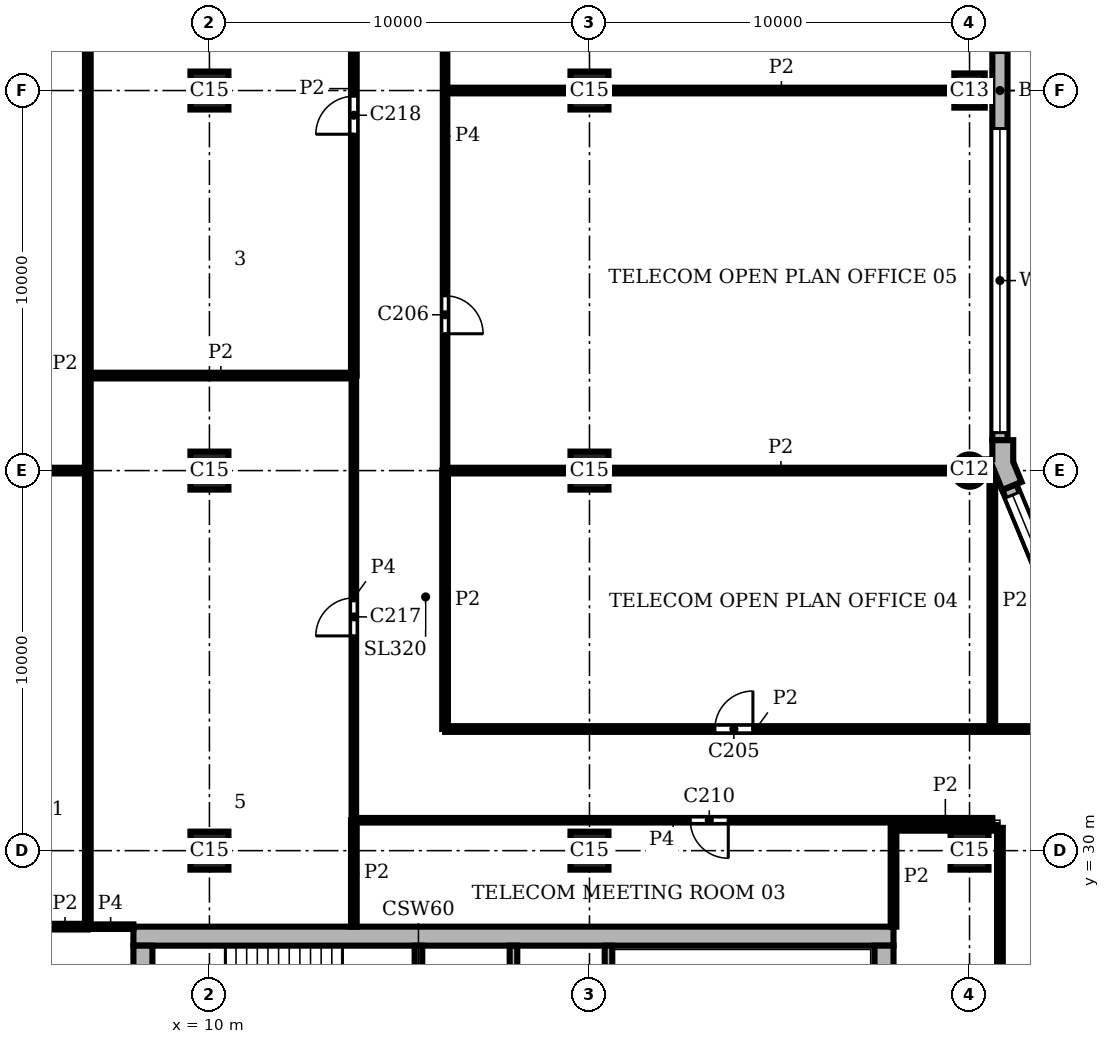
"""IFC4 building model, lengths in metres.
Left out: names, types, materials, properties, quantities, classifications, styles, units other than length and angle.
Written with IfcOpenShell. Run it as: python <this file> out.ifc"""

import sys

from ifc_helpers import new_model, si_unit, direction, frame, frame_2d, origin, origin_2d, place, context, subcontext, project, spatial, polyline, rectangle, circle, outline, extrude, element, fill, save


model = new_model("IFC4")
c1 = context("Model", 3, precision=1e-05, world=origin(), true_north=direction((0.0, 1.0)))
c2 = subcontext(c1, "Body", "Model", "MODEL_VIEW")
j1 = project(units=[si_unit("LENGTHUNIT", "METRE"), si_unit("PLANEANGLEUNIT", "RADIAN")], contexts=[c1])
p1 = place(None, origin())
s1 = spatial("IfcSite", under=j1, at=p1, CompositionType="ELEMENT")
p2 = place(p1, origin())
s2 = spatial("IfcBuilding", under=s1, at=p2, CompositionType="ELEMENT")
p3 = place(p2, frame((0.0, 0.0, 263.1)))
s3 = spatial("IfcBuildingStorey", under=s2, at=p3, CompositionType="ELEMENT", Elevation=263.1)
p4 = place(p3, frame((30.0, 40.0, 0.0), z_axis=(0.0, 0.0, 1.0), x_axis=(1.0, 0.0, 0.0)))
e1 = element("IfcColumn", 1, at=p4, inside=s3, PredefinedType="COLUMN", context=c2, shape_type="SweptSolid", body=[
    extrude(circle(Radius=0.425, at=origin_2d()), origin(), (0.0, 0.0, 1.0), 3.9),
])
p5 = place(p3, frame((30.0, 50.0, 0.0), z_axis=(0.0, 0.0, 1.0), x_axis=(0.0, 1.0, 0.0)))
e2 = element("IfcColumn", 2, at=p5, inside=s3, PredefinedType="COLUMN", context=c2, shape_type="SweptSolid", body=[
    extrude(rectangle(XDim=0.9, YDim=0.8, at=origin_2d()), origin(), (0.0, 0.0, 1.0), 3.9),
])
for number, where, z_axis, x_axis in (
    (3, (10.0, 30.0, 0.0), (0.0, 0.0, 1.0), (1.0, 0.0, 0.0)),
    (4, (10.0, 40.0, 0.0), (0.0, 0.0, 1.0), (1.0, 0.0, 0.0)),
    (5, (10.0, 50.0, 0.0), (0.0, 0.0, 1.0), (1.0, 0.0, 0.0)),
    (6, (20.0, 30.0, 0.0), (0.0, 0.0, 1.0), (1.0, 0.0, 0.0)),
    (7, (20.0, 40.0, 0.0), (0.0, 0.0, 1.0), (1.0, 0.0, 0.0)),
    (8, (20.0, 50.0, 0.0), (0.0, 0.0, 1.0), (1.0, 0.0, 0.0)),
    (9, (30.0, 30.0, 0.0), (0.0, 0.0, 1.0), (1.0, 0.0, 0.0)),
):
    element("IfcColumn", number, at=place(p3, frame(where, z_axis=z_axis, x_axis=x_axis)), inside=s3, PredefinedType="COLUMN", context=c2, shape_type="SweptSolid", body=[
        extrude(rectangle(XDim=1.0, YDim=1.0, at=origin_2d()), origin(), (0.0, 0.0, 1.0), 3.9),
    ])
p6 = place(p3, frame((27.75, 8.5, 0.0), z_axis=(0.0, 0.0, 1.0), x_axis=(0.0, 1.0, 0.0)))
e10 = element("IfcWall", 10, at=p6, inside=s3, PredefinedType="SHEAR", context=c2, shape_type="SweptSolid", body=[
    extrude(rectangle(XDim=19.0, YDim=0.5, at=frame_2d((9.5, 0.0))), origin(), (0.0, 0.0, 1.0), 3.9),
])
p7 = place(p6, frame((4.95, 0.0, 0.0)))
e11 = element("IfcOpeningElement", 11, at=p7, cuts=e10, PredefinedType="OPENING", context=c2, shape_type="SweptSolid", body=[
    extrude(rectangle(XDim=1.6, YDim=2.1, at=frame_2d((0.8, 1.05))), frame((0.0, 0.26, 0.0), z_axis=(0.0, -1.0, 0.0), x_axis=(1.0, 0.0, 0.0)), (0.0, 0.0, 1.0), 0.52),
])
p8 = place(p3, frame((28.0, 27.75, 0.0), z_axis=(0.0, 0.0, 1.0), x_axis=(-1.0, 0.0, 0.0)))
e12 = element("IfcWall", 12, at=p8, inside=s3, PredefinedType="SHEAR", context=c2, shape_type="SweptSolid", body=[
    extrude(rectangle(XDim=20.0, YDim=0.5, at=frame_2d((10.0, 0.0))), origin(), (0.0, 0.0, 1.0), 3.9),
])
p9 = place(p3, frame((8.25, 27.5, 0.0), z_axis=(0.0, 0.0, 1.0), x_axis=(0.0, -1.0, 0.0)))
e13 = element("IfcWall", 13, at=p9, inside=s3, PredefinedType="SHEAR", context=c2, shape_type="SweptSolid", body=[
    extrude(rectangle(XDim=19.0, YDim=0.5, at=frame_2d((9.5, 0.0))), origin(), (0.0, 0.0, 1.0), 3.9),
])
p10 = place(p3, origin())
e14 = element("IfcWall", 14, at=p10, inside=s3, PredefinedType="SOLIDWALL", context=c2, shape_type="SweptSolid", body=[
    extrude(outline(polyline([(30.62, 39.995), (30.62, 40.071), (30.861, 39.49), (31.23, 39.644), (31.369, 39.701), (31.15, 40.229), (31.15, 40.8), (31.0, 40.8), (30.6, 40.8), (30.6, 40.295), (30.425, 40.295), (30.425, 39.995), (30.62, 39.995)])), origin(), (0.0, 0.0, 1.0), 3.9),
])
p11 = place(p3, frame((33.362, 33.974, 0.0), z_axis=(0.0, 0.0, 1.0), x_axis=(-0.382655745237, 0.923891000409, 0.0)))
e15 = element("IfcWall", 15, at=p11, inside=s3, PredefinedType="SOLIDWALL", context=c2, shape_type="SweptSolid", body=[
    extrude(rectangle(XDim=6.053, YDim=0.4, at=frame_2d((3.027, 0.0))), origin(), (0.0, 0.0, 1.0), 3.9),
])
p12 = place(p11, frame((0.227, 0.0, 0.9)))
e16 = element("IfcOpeningElement", 16, at=p12, cuts=e15, PredefinedType="OPENING", context=c2, shape_type="SweptSolid", body=[
    extrude(rectangle(XDim=5.6, YDim=2.35, at=frame_2d((2.8, 1.175))), frame((0.0, 0.21, 0.0), z_axis=(0.0, -1.0, 0.0), x_axis=(1.0, 0.0, 0.0)), (0.0, 0.0, 1.0), 0.42),
])
p13 = place(p3, frame((30.8, 40.8, 0.0), z_axis=(0.0, 0.0, 1.0), x_axis=(0.0, 1.0, 0.0)))
e17 = element("IfcWall", 17, at=p13, inside=s3, PredefinedType="SOLIDWALL", context=c2, shape_type="SweptSolid", body=[
    extrude(rectangle(XDim=18.4, YDim=0.4, at=frame_2d((9.2, 0.0))), origin(), (0.0, 0.0, 1.0), 3.9),
])
p14 = place(p13, frame((0.2, 0.0, 0.9)))
e18 = element("IfcOpeningElement", 18, at=p14, cuts=e17, PredefinedType="OPENING", context=c2, shape_type="SweptSolid", body=[
    extrude(rectangle(XDim=8.0, YDim=2.35, at=frame_2d((4.0, 1.175))), frame((0.0, 0.21, 0.0), z_axis=(0.0, -1.0, 0.0), x_axis=(1.0, 0.0, 0.0)), (0.0, 0.0, 1.0), 0.42),
])
p15 = place(p13, frame((10.2, 0.0, 0.9)))
e19 = element("IfcOpeningElement", 19, at=p15, cuts=e17, PredefinedType="OPENING", context=c2, shape_type="SweptSolid", body=[
    extrude(rectangle(XDim=8.0, YDim=2.35, at=frame_2d((4.0, 1.175))), frame((0.0, 0.21, 0.0), z_axis=(0.0, -1.0, 0.0), x_axis=(1.0, 0.0, 0.0)), (0.0, 0.0, 1.0), 0.42),
])
p16 = place(p3, frame((15.5, 23.6, 0.0), z_axis=(0.0, 0.0, 1.0), x_axis=(0.0, 1.0, 0.0)))
e20 = element("IfcWall", 20, at=p16, inside=s3, PredefinedType="SHEAR", context=c2, shape_type="SweptSolid", body=[
    extrude(rectangle(XDim=3.9, YDim=0.2, at=frame_2d((1.95, 0.0))), origin(), (0.0, 0.0, 1.0), 3.58),
])
p17 = place(p3, frame((18.0, 20.0, 0.0), z_axis=(0.0, 0.0, 1.0), x_axis=(0.0, 1.0, 0.0)))
e21 = element("IfcWall", 21, at=p17, inside=s3, PredefinedType="SHEAR", context=c2, shape_type="SweptSolid", body=[
    extrude(rectangle(XDim=7.5, YDim=0.2, at=frame_2d((3.75, 0.0))), origin(), (0.0, 0.0, 1.0), 3.58),
])
p18 = place(p17, frame((1.2, 0.0, 0.0)))
e22 = element("IfcOpeningElement", 22, at=p18, cuts=e21, PredefinedType="OPENING", context=c2, shape_type="SweptSolid", body=[
    extrude(rectangle(XDim=1.2, YDim=2.1, at=frame_2d((0.6, 1.05))), frame((0.0, 0.11, 0.0), z_axis=(0.0, -1.0, 0.0), x_axis=(1.0, 0.0, 0.0)), (0.0, 0.0, 1.0), 0.22),
])
p19 = place(p3, frame((20.5, 23.6, 0.0), z_axis=(0.0, 0.0, 1.0), x_axis=(0.0, 1.0, 0.0)))
e23 = element("IfcWall", 23, at=p19, inside=s3, PredefinedType="SHEAR", context=c2, shape_type="SweptSolid", body=[
    extrude(rectangle(XDim=3.9, YDim=0.2, at=frame_2d((1.95, 0.0))), origin(), (0.0, 0.0, 1.0), 3.58),
])
p20 = place(p3, frame((6.8, 28.0, 0.0), z_axis=(0.0, 0.0, 1.0), x_axis=(0.0, 1.0, 0.0)))
e24 = element("IfcWall", 24, at=p20, inside=s3, PredefinedType="PARTITIONING", context=c2, shape_type="SweptSolid", body=[
    extrude(rectangle(XDim=29.6, YDim=0.15, at=frame_2d((14.8, 0.0))), origin(), (0.0, 0.0, 1.0), 3.58),
])
p21 = place(p3, frame((13.8, 28.0, 0.0), z_axis=(0.0, 0.0, 1.0), x_axis=(0.0, 1.0, 0.0)))
e25 = element("IfcWall", 25, at=p21, inside=s3, PredefinedType="PARTITIONING", context=c2, shape_type="SweptSolid", body=[
    extrude(rectangle(XDim=2.8, YDim=0.15, at=frame_2d((1.4, 0.0))), origin(), (0.0, 0.0, 1.0), 3.58),
])
p22 = place(p3, frame((13.8, 42.5, 0.0), z_axis=(0.0, 0.0, 1.0), x_axis=(0.0, 1.0, 0.0)))
e26 = element("IfcWall", 26, at=p22, inside=s3, PredefinedType="PARTITIONING", context=c2, shape_type="SweptSolid", body=[
    extrude(rectangle(XDim=15.1, YDim=0.15, at=frame_2d((7.55, 0.0))), origin(), (0.0, 0.0, 1.0), 3.58),
])
p23 = place(p22, frame((6.35, 0.0, 0.0)))
e27 = element("IfcOpeningElement", 27, at=p23, cuts=e26, PredefinedType="OPENING", context=c2, shape_type="SweptSolid", body=[
    extrude(rectangle(XDim=1.0, YDim=2.1, at=frame_2d((0.5, 1.05))), frame((0.0, 0.085, 0.0), z_axis=(0.0, -1.0, 0.0), x_axis=(1.0, 0.0, 0.0)), (0.0, 0.0, 1.0), 0.17),
])
p24 = place(p3, frame((16.2, 33.2, 0.0), z_axis=(0.0, 0.0, 1.0), x_axis=(0.0, 1.0, 0.0)))
e28 = element("IfcWall", 28, at=p24, inside=s3, PredefinedType="PARTITIONING", context=c2, shape_type="SweptSolid", body=[
    extrude(rectangle(XDim=6.8, YDim=0.15, at=frame_2d((3.4, 0.0))), origin(), (0.0, 0.0, 1.0), 3.58),
])
p25 = place(p3, frame((28.0, 28.0, 0.0), z_axis=(0.0, 0.0, 1.0), x_axis=(0.0, 1.0, 0.0)))
e29 = element("IfcWall", 29, at=p25, inside=s3, PredefinedType="PARTITIONING", context=c2, shape_type="SweptSolid", body=[
    extrude(rectangle(XDim=2.598, YDim=0.15, at=frame_2d((1.299, 0.0))), origin(), (0.0, 0.0, 1.0), 3.58),
])
p26 = place(p3, frame((30.6, 33.2, 0.0), z_axis=(0.0, 0.0, 1.0), x_axis=(0.0, 1.0, 0.0)))
e30 = element("IfcWall", 30, at=p26, inside=s3, PredefinedType="PARTITIONING", context=c2, shape_type="SweptSolid", body=[
    extrude(rectangle(XDim=6.738, YDim=0.15, at=frame_2d((3.369, 0.0))), origin(), (0.0, 0.0, 1.0), 3.58),
])
p27 = place(p3, frame((30.8, 15.45, 0.0), z_axis=(0.0, 0.0, 1.0), x_axis=(0.0, 1.0, 0.0)))
e31 = element("IfcWall", 31, at=p27, inside=s3, PredefinedType="PARTITIONING", context=c2, shape_type="SweptSolid", body=[
    extrude(rectangle(XDim=15.15, YDim=0.15, at=frame_2d((7.575, 0.0))), origin(), (0.0, 0.0, 1.0), 3.58),
])
p28 = place(p27, frame((8.6, 0.0, 0.0)))
e32 = element("IfcOpeningElement", 32, at=p28, cuts=e31, PredefinedType="OPENING", context=c2, shape_type="SweptSolid", body=[
    extrude(rectangle(XDim=1.0, YDim=2.1, at=frame_2d((0.5, 1.05))), frame((0.0, 0.085, 0.0), z_axis=(0.0, -1.0, 0.0), x_axis=(1.0, 0.0, 0.0)), (0.0, 0.0, 1.0), 0.17),
])
p29 = place(p3, frame((5.6, 28.0, 0.0), z_axis=(0.0, 0.0, 1.0), x_axis=(1.0, 0.0, 0.0)))
e33 = element("IfcWall", 33, at=p29, inside=s3, PredefinedType="PARTITIONING", context=c2, shape_type="SweptSolid", body=[
    extrude(rectangle(XDim=1.2, YDim=0.15, at=frame_2d((0.6, 0.0))), origin(), (0.0, 0.0, 1.0), 3.58),
])
p30 = place(p3, frame((28.002, 30.6, 0.0), z_axis=(0.0, 0.0, 1.0), x_axis=(1.0, 0.0, 0.0)))
e34 = element("IfcWall", 34, at=p30, inside=s3, PredefinedType="PARTITIONING", context=c2, shape_type="SweptSolid", body=[
    extrude(rectangle(XDim=2.723, YDim=0.15, at=frame_2d((1.362, 0.0))), origin(), (0.0, 0.0, 1.0), 3.58),
])
p31 = place(p3, frame((16.2, 33.2, 0.0), z_axis=(0.0, 0.0, 1.0), x_axis=(1.0, 0.0, 0.0)))
e35 = element("IfcWall", 35, at=p31, inside=s3, PredefinedType="PARTITIONING", context=c2, shape_type="SweptSolid", body=[
    extrude(rectangle(XDim=16.352, YDim=0.15, at=frame_2d((8.176, 0.0))), origin(), (0.0, 0.0, 1.0), 3.58),
])
p32 = place(p31, frame((7.1, 0.0, 0.0)))
e36 = element("IfcOpeningElement", 36, at=p32, cuts=e35, PredefinedType="OPENING", context=c2, shape_type="SweptSolid", body=[
    extrude(rectangle(XDim=1.0, YDim=2.1, at=frame_2d((0.5, 1.05))), frame((0.0, 0.085, 0.0), z_axis=(0.0, -1.0, 0.0), x_axis=(1.0, 0.0, 0.0)), (0.0, 0.0, 1.0), 0.17),
])
p33 = place(p3, frame((0.4, 40.0, 0.0), z_axis=(0.0, 0.0, 1.0), x_axis=(1.0, 0.0, 0.0)))
e37 = element("IfcWall", 37, at=p33, inside=s3, PredefinedType="PARTITIONING", context=c2, shape_type="SweptSolid", body=[
    extrude(rectangle(XDim=6.4, YDim=0.15, at=frame_2d((3.2, 0.0))), origin(), (0.0, 0.0, 1.0), 3.58),
])
p34 = place(p3, frame((16.2, 40.0, 0.0), z_axis=(0.0, 0.0, 1.0), x_axis=(1.0, 0.0, 0.0)))
e38 = element("IfcWall", 38, at=p34, inside=s3, PredefinedType="PARTITIONING", context=c2, shape_type="SweptSolid", body=[
    extrude(rectangle(XDim=3.3, YDim=0.15, at=frame_2d((1.65, 0.0))), origin(), (0.0, 0.0, 1.0), 3.58),
])
p35 = place(p3, frame((20.5, 40.0, 0.0), z_axis=(0.0, 0.0, 1.0), x_axis=(1.0, 0.0, 0.0)))
e39 = element("IfcWall", 39, at=p35, inside=s3, PredefinedType="PARTITIONING", context=c2, shape_type="SweptSolid", body=[
    extrude(rectangle(XDim=9.075, YDim=0.15, at=frame_2d((4.538, 0.0))), origin(), (0.0, 0.0, 1.0), 3.58),
])
p36 = place(p3, frame((6.8, 42.5, 0.0), z_axis=(0.0, 0.0, 1.0), x_axis=(1.0, 0.0, 0.0)))
e40 = element("IfcWall", 40, at=p36, inside=s3, PredefinedType="PARTITIONING", context=c2, shape_type="SweptSolid", body=[
    extrude(rectangle(XDim=7.0, YDim=0.15, at=frame_2d((3.5, 0.0))), origin(), (0.0, 0.0, 1.0), 3.58),
])
p37 = place(p3, frame((16.2, 50.0, 0.0), z_axis=(0.0, 0.0, 1.0), x_axis=(1.0, 0.0, 0.0)))
e41 = element("IfcWall", 41, at=p37, inside=s3, PredefinedType="PARTITIONING", context=c2, shape_type="SweptSolid", body=[
    extrude(rectangle(XDim=3.3, YDim=0.15, at=frame_2d((1.65, 0.0))), origin(), (0.0, 0.0, 1.0), 3.58),
])
p38 = place(p3, frame((20.5, 50.0, 0.0), z_axis=(0.0, 0.0, 1.0), x_axis=(1.0, 0.0, 0.0)))
e42 = element("IfcWall", 42, at=p38, inside=s3, PredefinedType="PARTITIONING", context=c2, shape_type="SweptSolid", body=[
    extrude(rectangle(XDim=9.1, YDim=0.15, at=frame_2d((4.55, 0.0))), origin(), (0.0, 0.0, 1.0), 3.58),
])
p39 = place(p3, frame((13.8, 30.8, 0.0), z_axis=(0.0, 0.0, 1.0), x_axis=(0.0, 1.0, 0.0)))
e43 = element("IfcWall", 43, at=p39, inside=s3, PredefinedType="PARTITIONING", context=c2, shape_type="SweptSolid", body=[
    extrude(rectangle(XDim=11.7, YDim=0.12, at=frame_2d((5.85, 0.0))), origin(), (0.0, 0.0, 1.0), 3.58),
])
p40 = place(p39, frame((4.85, 0.0, 0.0)))
e44 = element("IfcOpeningElement", 44, at=p40, cuts=e43, PredefinedType="OPENING", context=c2, shape_type="SweptSolid", body=[
    extrude(rectangle(XDim=1.0, YDim=2.1, at=frame_2d((0.5, 1.05))), frame((0.0, 0.07, 0.0), z_axis=(0.0, -1.0, 0.0), x_axis=(1.0, 0.0, 0.0)), (0.0, 0.0, 1.0), 0.14),
])
p41 = place(p3, frame((16.2, 40.0, 0.0), z_axis=(0.0, 0.0, 1.0), x_axis=(0.0, 1.0, 0.0)))
e45 = element("IfcWall", 45, at=p41, inside=s3, PredefinedType="PARTITIONING", context=c2, shape_type="SweptSolid", body=[
    extrude(rectangle(XDim=17.6, YDim=0.12, at=frame_2d((8.8, 0.0))), origin(), (0.0, 0.0, 1.0), 3.58),
])
p42 = place(p41, frame((3.6, 0.0, 0.0)))
e46 = element("IfcOpeningElement", 46, at=p42, cuts=e45, PredefinedType="OPENING", context=c2, shape_type="SweptSolid", body=[
    extrude(rectangle(XDim=1.0, YDim=2.1, at=frame_2d((0.5, 1.05))), frame((0.0, 0.07, 0.0), z_axis=(0.0, -1.0, 0.0), x_axis=(1.0, 0.0, 0.0)), (0.0, 0.0, 1.0), 0.14),
])
p43 = place(p3, frame((6.8, 28.0, 0.0), z_axis=(0.0, 0.0, 1.0), x_axis=(1.0, 0.0, 0.0)))
e47 = element("IfcWall", 47, at=p43, inside=s3, PredefinedType="PARTITIONING", context=c2, shape_type="SweptSolid", body=[
    extrude(rectangle(XDim=1.2, YDim=0.12, at=frame_2d((0.6, 0.0))), origin(), (0.0, 0.0, 1.0), 3.58),
])
p44 = place(p3, frame((13.802, 30.8, 0.0), z_axis=(0.0, 0.0, 1.0), x_axis=(1.0, 0.0, 0.0)))
e48 = element("IfcWall", 48, at=p44, inside=s3, PredefinedType="PARTITIONING", context=c2, shape_type="SweptSolid", body=[
    extrude(rectangle(XDim=16.798, YDim=0.12, at=frame_2d((8.399, 0.0))), origin(), (0.0, 0.0, 1.0), 3.58),
])
p45 = place(p44, frame((8.85, 0.0, 0.0)))
e49 = element("IfcOpeningElement", 49, at=p45, cuts=e48, PredefinedType="OPENING", context=c2, shape_type="SweptSolid", body=[
    extrude(rectangle(XDim=1.0, YDim=2.1, at=frame_2d((0.5, 1.05))), frame((0.0, 0.07, 0.0), z_axis=(0.0, -1.0, 0.0), x_axis=(1.0, 0.0, 0.0)), (0.0, 0.0, 1.0), 0.14),
])
p46 = place(p12, origin())
e50 = element("IfcWindow", 50, at=p46, inside=s3, PartitioningType="SINGLE_PANEL", PredefinedType="WINDOW", context=c2, shape_type="SweptSolid", body=[
    extrude(rectangle(XDim=5.6, YDim=2.35, at=frame_2d((2.8, 1.175))), frame((0.0, 0.16, 0.0), z_axis=(0.0, -1.0, 0.0), x_axis=(1.0, 0.0, 0.0)), (0.0, 0.0, 1.0), 0.06),
])
fill(e16, e50)
p47 = place(p14, origin())
e51 = element("IfcWindow", 51, at=p47, inside=s3, PartitioningType="SINGLE_PANEL", PredefinedType="WINDOW", context=c2, shape_type="SweptSolid", body=[
    extrude(rectangle(XDim=8.0, YDim=2.35, at=frame_2d((4.0, 1.175))), frame((0.0, 0.16, 0.0), z_axis=(0.0, -1.0, 0.0), x_axis=(1.0, 0.0, 0.0)), (0.0, 0.0, 1.0), 0.06),
])
fill(e18, e51)
p48 = place(p32, origin())
e52 = element("IfcDoor", 52, at=p48, inside=s3, OperationType="SINGLE_SWING_RIGHT", PredefinedType="DOOR", context=c2, shape_type="SweptSolid", body=[
    extrude(rectangle(XDim=1.0, YDim=2.1, at=frame_2d((0.5, 1.05))), frame((0.0, 0.025, 0.0), z_axis=(0.0, -1.0, 0.0), x_axis=(1.0, 0.0, 0.0)), (0.0, 0.0, 1.0), 0.05),
])
fill(e36, e52)
p49 = place(p42, frame((1.0, 0.0, 0.0), z_axis=(0.0, 0.0, 1.0), x_axis=(-1.0, 0.0, 0.0)))
e53 = element("IfcDoor", 53, at=p49, inside=s3, OperationType="SINGLE_SWING_RIGHT", PredefinedType="DOOR", context=c2, shape_type="SweptSolid", body=[
    extrude(rectangle(XDim=1.0, YDim=2.1, at=frame_2d((0.5, 1.05))), frame((0.0, 0.025, 0.0), z_axis=(0.0, -1.0, 0.0), x_axis=(1.0, 0.0, 0.0)), (0.0, 0.0, 1.0), 0.05),
])
fill(e46, e53)
p50 = place(p45, frame((1.0, 0.0, 0.0), z_axis=(0.0, 0.0, 1.0), x_axis=(-1.0, 0.0, 0.0)))
e54 = element("IfcDoor", 54, at=p50, inside=s3, OperationType="SINGLE_SWING_LEFT", PredefinedType="DOOR", context=c2, shape_type="SweptSolid", body=[
    extrude(rectangle(XDim=1.0, YDim=2.1, at=frame_2d((0.5, 1.05))), frame((0.0, 0.025, 0.0), z_axis=(0.0, -1.0, 0.0), x_axis=(1.0, 0.0, 0.0)), (0.0, 0.0, 1.0), 0.05),
])
fill(e49, e54)
p51 = place(p40, origin())
e55 = element("IfcDoor", 55, at=p51, inside=s3, OperationType="SINGLE_SWING_LEFT", PredefinedType="DOOR", context=c2, shape_type="SweptSolid", body=[
    extrude(rectangle(XDim=1.0, YDim=2.1, at=frame_2d((0.5, 1.05))), frame((0.0, 0.025, 0.0), z_axis=(0.0, -1.0, 0.0), x_axis=(1.0, 0.0, 0.0)), (0.0, 0.0, 1.0), 0.05),
])
fill(e44, e55)
p52 = place(p23, origin())
e56 = element("IfcDoor", 56, at=p52, inside=s3, OperationType="SINGLE_SWING_LEFT", PredefinedType="DOOR", context=c2, shape_type="SweptSolid", body=[
    extrude(rectangle(XDim=1.0, YDim=2.1, at=frame_2d((0.5, 1.05))), frame((0.0, 0.025, 0.0), z_axis=(0.0, -1.0, 0.0), x_axis=(1.0, 0.0, 0.0)), (0.0, 0.0, 1.0), 0.05),
])
fill(e27, e56)
save(model, sys.argv[1])
